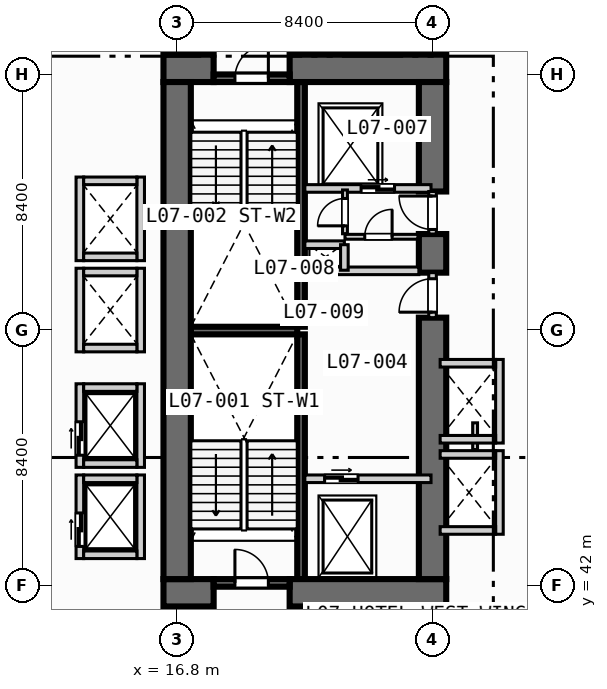
"""IFC4 building model, lengths in metres.
Left out: names, types, materials, properties, quantities, classifications, styles, units other than length and angle.
Written with IfcOpenShell. Run it as: python <this file> out.ifc"""

import sys

from ifc_helpers import new_model, si_unit, direction, frame, frame_2d, origin, place, context, subcontext, project, spatial, rectangle, extrude, element, fill, save


model = new_model("IFC4")
c1 = context("Model", 3, precision=1e-05, world=origin(), true_north=direction((0.0, 1.0)))
c2 = subcontext(c1, "Body", "Model", "MODEL_VIEW")
j1 = project(units=[si_unit("LENGTHUNIT", "METRE"), si_unit("PLANEANGLEUNIT", "RADIAN")], contexts=[c1])
p1 = place(None, origin())
s1 = spatial("IfcSite", under=j1, at=p1, CompositionType="ELEMENT")
p2 = place(p1, origin())
s2 = spatial("IfcBuilding", under=s1, at=p2, CompositionType="ELEMENT")
p3 = place(p2, frame((0.0, 0.0, 35.8)))
s3 = spatial("IfcBuildingStorey", under=s2, at=p3, CompositionType="ELEMENT", Elevation=35.8)
for number, where, z_axis, x_axis in (
    (1, (20.875, 42.2, 0.0), (0.0, 0.0, 1.0), (0.0, 1.0, 0.0)),
    (2, (20.875, 50.5, 0.0), (0.0, 0.0, 1.0), (0.0, 1.0, 0.0)),
):
    element("IfcWall", number, at=place(p3, frame(where, z_axis=z_axis, x_axis=x_axis)), inside=s3, PredefinedType="SOLIDWALL", context=c2, shape_type="SweptSolid", body=[
        extrude(rectangle(XDim=8.05, YDim=0.25, at=frame_2d((4.025, 0.0))), origin(), (0.0, 0.0, 1.0), 3.55),
    ])
p4 = place(p3, frame((17.25, 50.375, 0.0), z_axis=(0.0, 0.0, 1.0), x_axis=(1.0, 0.0, 0.0)))
e3 = element("IfcWall", 3, at=p4, inside=s3, PredefinedType="SOLIDWALL", context=c2, shape_type="SweptSolid", body=[
    extrude(rectangle(XDim=3.5, YDim=0.25, at=frame_2d((1.75, 0.0))), origin(), (0.0, 0.0, 1.0), 3.55),
])
p5 = place(p3, frame((16.35, 41.75, 0.0), z_axis=(0.0, 0.0, 1.0), x_axis=(1.0, 0.0, 0.0)))
e4 = element("IfcWall", 4, at=p5, inside=s3, PredefinedType="SHEAR", context=c2, shape_type="SweptSolid", body=[
    extrude(rectangle(XDim=1.65, YDim=0.9, at=frame_2d((0.825, 0.0))), origin(), (0.0, 0.0, 1.0), 3.55),
])
p6 = place(p3, frame((20.5, 41.75, 0.0), z_axis=(0.0, 0.0, 1.0), x_axis=(1.0, 0.0, 0.0)))
e5 = element("IfcWall", 5, at=p6, inside=s3, PredefinedType="SHEAR", context=c2, shape_type="SweptSolid", body=[
    extrude(rectangle(XDim=5.15, YDim=0.9, at=frame_2d((2.575, 0.0))), origin(), (0.0, 0.0, 1.0), 3.55),
])
p7 = place(p3, frame((16.35, 59.0, 0.0), z_axis=(0.0, 0.0, 1.0), x_axis=(1.0, 0.0, 0.0)))
e6 = element("IfcWall", 6, at=p7, inside=s3, PredefinedType="SHEAR", context=c2, shape_type="SweptSolid", body=[
    extrude(rectangle(XDim=1.65, YDim=0.9, at=frame_2d((0.825, 0.0))), origin(), (0.0, 0.0, 1.0), 3.55),
])
p8 = place(p3, frame((20.5, 59.0, 0.0), z_axis=(0.0, 0.0, 1.0), x_axis=(1.0, 0.0, 0.0)))
e7 = element("IfcWall", 7, at=p8, inside=s3, PredefinedType="SHEAR", context=c2, shape_type="SweptSolid", body=[
    extrude(rectangle(XDim=5.15, YDim=0.9, at=frame_2d((2.575, 0.0))), origin(), (0.0, 0.0, 1.0), 3.55),
])
p9 = place(p3, frame((16.8, 42.2, 0.0), z_axis=(0.0, 0.0, 1.0), x_axis=(0.0, 1.0, 0.0)))
e8 = element("IfcWall", 8, at=p9, inside=s3, PredefinedType="SHEAR", context=c2, shape_type="SweptSolid", body=[
    extrude(rectangle(XDim=16.35, YDim=0.9, at=frame_2d((8.175, 0.0))), origin(), (0.0, 0.0, 1.0), 3.55),
])
p10 = place(p3, frame((25.2, 42.2, 0.0), z_axis=(0.0, 0.0, 1.0), x_axis=(0.0, 1.0, 0.0)))
e9 = element("IfcWall", 9, at=p10, inside=s3, PredefinedType="SHEAR", context=c2, shape_type="SweptSolid", body=[
    extrude(rectangle(XDim=8.6, YDim=0.9, at=frame_2d((4.3, 0.0))), origin(), (0.0, 0.0, 1.0), 3.55),
])
p11 = place(p3, frame((25.2, 52.28, 0.0), z_axis=(0.0, 0.0, 1.0), x_axis=(0.0, 1.0, 0.0)))
e10 = element("IfcWall", 10, at=p11, inside=s3, PredefinedType="SHEAR", context=c2, shape_type="SweptSolid", body=[
    extrude(rectangle(XDim=1.27, YDim=0.9, at=frame_2d((0.635, 0.0))), origin(), (0.0, 0.0, 1.0), 3.55),
])
p12 = place(p3, frame((25.2, 54.95, 0.0), z_axis=(0.0, 0.0, 1.0), x_axis=(0.0, 1.0, 0.0)))
e11 = element("IfcWall", 11, at=p12, inside=s3, PredefinedType="SHEAR", context=c2, shape_type="SweptSolid", body=[
    extrude(rectangle(XDim=3.6, YDim=0.9, at=frame_2d((1.8, 0.0))), origin(), (0.0, 0.0, 1.0), 3.55),
])
p13 = place(p3, frame((18.0, 42.075, 0.0), z_axis=(0.0, 0.0, 1.0), x_axis=(1.0, 0.0, 0.0)))
e12 = element("IfcWall", 12, at=p13, inside=s3, PredefinedType="SOLIDWALL", context=c2, shape_type="SweptSolid", body=[
    extrude(rectangle(XDim=2.5, YDim=0.25, at=frame_2d((1.25, 0.0))), origin(), (0.0, 0.0, 1.0), 3.55),
])
p14 = place(p13, frame((0.7, 0.0, 0.0)))
e13 = element("IfcOpeningElement", 13, at=p14, cuts=e12, PredefinedType="OPENING", context=c2, shape_type="SweptSolid", body=[
    extrude(rectangle(XDim=1.1, YDim=2.15, at=frame_2d((0.55, 1.075))), frame((0.0, 0.135, 0.0), z_axis=(0.0, -1.0, 0.0), x_axis=(1.0, 0.0, 0.0)), (0.0, 0.0, 1.0), 0.27),
])
p15 = place(p3, frame((18.0, 58.675, 0.0), z_axis=(0.0, 0.0, 1.0), x_axis=(1.0, 0.0, 0.0)))
e14 = element("IfcWall", 14, at=p15, inside=s3, PredefinedType="SOLIDWALL", context=c2, shape_type="SweptSolid", body=[
    extrude(rectangle(XDim=2.5, YDim=0.25, at=frame_2d((1.25, 0.0))), origin(), (0.0, 0.0, 1.0), 3.55),
])
p16 = place(p15, frame((0.7, 0.0, 0.0)))
e15 = element("IfcOpeningElement", 15, at=p16, cuts=e14, PredefinedType="OPENING", context=c2, shape_type="SweptSolid", body=[
    extrude(rectangle(XDim=1.1, YDim=2.15, at=frame_2d((0.55, 1.075))), frame((0.0, 0.135, 0.0), z_axis=(0.0, -1.0, 0.0), x_axis=(1.0, 0.0, 0.0)), (0.0, 0.0, 1.0), 0.27),
])
p17 = place(p3, frame((21.0, 45.5, 0.0), z_axis=(0.0, 0.0, 1.0), x_axis=(1.0, 0.0, 0.0)))
e16 = element("IfcWall", 16, at=p17, inside=s3, PredefinedType="SOLIDWALL", context=c2, shape_type="SweptSolid", body=[
    extrude(rectangle(XDim=4.15, YDim=0.25, at=frame_2d((2.075, 0.0))), origin(), (0.0, 0.0, 1.0), 3.55),
])
p18 = place(p17, frame((0.65, 0.0, 0.0)))
e17 = element("IfcOpeningElement", 17, at=p18, cuts=e16, PredefinedType="OPENING", context=c2, shape_type="SweptSolid", body=[
    extrude(rectangle(XDim=1.1, YDim=2.15, at=frame_2d((0.55, 1.075))), frame((0.0, 0.135, 0.0), z_axis=(0.0, -1.0, 0.0), x_axis=(1.0, 0.0, 0.0)), (0.0, 0.0, 1.0), 0.27),
])
p19 = place(p3, frame((25.2, 50.8, 0.0), z_axis=(0.0, 0.0, 1.0), x_axis=(0.0, 1.0, 0.0)))
e18 = element("IfcWall", 18, at=p19, inside=s3, PredefinedType="SOLIDWALL", context=c2, shape_type="SweptSolid", body=[
    extrude(rectangle(XDim=1.48, YDim=0.25, at=frame_2d((0.74, 0.0))), origin(), (0.0, 0.0, 1.0), 3.55),
])
p20 = place(p19, frame((0.18, 0.0, 0.0)))
e19 = element("IfcOpeningElement", 19, at=p20, cuts=e18, PredefinedType="OPENING", context=c2, shape_type="SweptSolid", body=[
    extrude(rectangle(XDim=1.1, YDim=2.15, at=frame_2d((0.55, 1.075))), frame((0.0, 0.135, 0.0), z_axis=(0.0, -1.0, 0.0), x_axis=(1.0, 0.0, 0.0)), (0.0, 0.0, 1.0), 0.27),
])
p21 = place(p3, frame((21.0, 52.34, 0.0), z_axis=(0.0, 0.0, 1.0), x_axis=(1.0, 0.0, 0.0)))
e20 = element("IfcWall", 20, at=p21, inside=s3, PredefinedType="SOLIDWALL", context=c2, shape_type="SweptSolid", body=[
    extrude(rectangle(XDim=3.75, YDim=0.25, at=frame_2d((1.875, 0.0))), origin(), (0.0, 0.0, 1.0), 3.55),
])
p22 = place(p3, frame((21.0, 55.05, 0.0), z_axis=(0.0, 0.0, 1.0), x_axis=(1.0, 0.0, 0.0)))
e21 = element("IfcWall", 21, at=p22, inside=s3, PredefinedType="SOLIDWALL", context=c2, shape_type="SweptSolid", body=[
    extrude(rectangle(XDim=4.15, YDim=0.25, at=frame_2d((2.075, 0.0))), origin(), (0.0, 0.0, 1.0), 3.55),
])
p23 = place(p22, frame((1.85, 0.0, 0.0)))
e22 = element("IfcOpeningElement", 22, at=p23, cuts=e21, PredefinedType="OPENING", context=c2, shape_type="SweptSolid", body=[
    extrude(rectangle(XDim=1.1, YDim=2.15, at=frame_2d((0.55, 1.075))), frame((0.0, 0.135, 0.0), z_axis=(0.0, -1.0, 0.0), x_axis=(1.0, 0.0, 0.0)), (0.0, 0.0, 1.0), 0.27),
])
p24 = place(p3, frame((25.2, 53.55, 0.0), z_axis=(0.0, 0.0, 1.0), x_axis=(0.0, 1.0, 0.0)))
e23 = element("IfcWall", 23, at=p24, inside=s3, PredefinedType="SOLIDWALL", context=c2, shape_type="SweptSolid", body=[
    extrude(rectangle(XDim=1.4, YDim=0.25, at=frame_2d((0.7, 0.0))), origin(), (0.0, 0.0, 1.0), 3.55),
])
p25 = place(p24, frame((0.15, 0.0, 0.0)))
e24 = element("IfcOpeningElement", 24, at=p25, cuts=e23, PredefinedType="OPENING", context=c2, shape_type="SweptSolid", body=[
    extrude(rectangle(XDim=1.1, YDim=2.15, at=frame_2d((0.55, 1.075))), frame((0.0, 0.135, 0.0), z_axis=(0.0, -1.0, 0.0), x_axis=(1.0, 0.0, 0.0)), (0.0, 0.0, 1.0), 0.27),
])
p26 = place(p3, frame((21.0, 53.2, 0.0), z_axis=(0.0, 0.0, 1.0), x_axis=(1.0, 0.0, 0.0)))
e25 = element("IfcWall", 25, at=p26, inside=s3, PredefinedType="SOLIDWALL", context=c2, shape_type="SweptSolid", body=[
    extrude(rectangle(XDim=1.3, YDim=0.25, at=frame_2d((0.65, 0.0))), origin(), (0.0, 0.0, 1.0), 3.55),
])
p27 = place(p3, frame((22.3, 52.36, 0.0), z_axis=(0.0, 0.0, 1.0), x_axis=(0.0, 1.0, 0.0)))
e26 = element("IfcWall", 26, at=p27, inside=s3, PredefinedType="SOLIDWALL", context=c2, shape_type="SweptSolid", body=[
    extrude(rectangle(XDim=0.84, YDim=0.25, at=frame_2d((0.42, 0.0))), origin(), (0.0, 0.0, 1.0), 3.55),
])
p28 = place(p3, frame((22.32, 53.56, 0.0), z_axis=(0.0, 0.0, 1.0), x_axis=(0.0, 1.0, 0.0)))
e27 = element("IfcWall", 27, at=p28, inside=s3, PredefinedType="PARTITIONING", context=c2, shape_type="SweptSolid", body=[
    extrude(rectangle(XDim=1.44, YDim=0.16, at=frame_2d((0.72, 0.0))), origin(), (0.0, 0.0, 1.0), 3.55),
])
p29 = place(p28, frame((0.26, 0.0, 0.0)))
e28 = element("IfcOpeningElement", 28, at=p29, cuts=e27, PredefinedType="OPENING", context=c2, shape_type="SweptSolid", body=[
    extrude(rectangle(XDim=0.9, YDim=2.1, at=frame_2d((0.45, 1.05))), frame((0.0, 0.09, 0.0), z_axis=(0.0, -1.0, 0.0), x_axis=(1.0, 0.0, 0.0)), (0.0, 0.0, 1.0), 0.18),
])
p30 = place(p3, frame((22.32, 53.46, 0.0), z_axis=(0.0, 0.0, 1.0), x_axis=(1.0, 0.0, 0.0)))
e29 = element("IfcWall", 29, at=p30, inside=s3, PredefinedType="PARTITIONING", context=c2, shape_type="SweptSolid", body=[
    extrude(rectangle(XDim=2.4, YDim=0.16, at=frame_2d((1.2, 0.0))), origin(), (0.0, 0.0, 1.0), 3.55),
])
p31 = place(p30, frame((0.65, 0.0, 0.0)))
e30 = element("IfcOpeningElement", 30, at=p31, cuts=e29, PredefinedType="OPENING", context=c2, shape_type="SweptSolid", body=[
    extrude(rectangle(XDim=0.9, YDim=2.1, at=frame_2d((0.45, 1.05))), frame((0.0, 0.09, 0.0), z_axis=(0.0, -1.0, 0.0), x_axis=(1.0, 0.0, 0.0)), (0.0, 0.0, 1.0), 0.18),
])
p32 = place(p3, frame((13.6, 42.875, 0.0), z_axis=(0.0, 0.0, 1.0), x_axis=(0.0, 1.0, 0.0)))
e31 = element("IfcWall", 31, at=p32, inside=s3, PredefinedType="SOLIDWALL", context=c2, shape_type="SweptSolid", body=[
    extrude(rectangle(XDim=2.75, YDim=0.25, at=frame_2d((1.375, 0.0))), origin(), (0.0, 0.0, 1.0), 3.55),
])
p33 = place(p32, frame((0.4, 0.0, 0.0)))
e32 = element("IfcOpeningElement", 32, at=p33, cuts=e31, PredefinedType="OPENING", context=c2, shape_type="SweptSolid", body=[
    extrude(rectangle(XDim=1.1, YDim=2.15, at=frame_2d((0.55, 1.075))), frame((0.0, 0.135, 0.0), z_axis=(0.0, -1.0, 0.0), x_axis=(1.0, 0.0, 0.0)), (0.0, 0.0, 1.0), 0.27),
])
p34 = place(p3, frame((15.6, 42.875, 0.0), z_axis=(0.0, 0.0, 1.0), x_axis=(0.0, 1.0, 0.0)))
e33 = element("IfcWall", 33, at=p34, inside=s3, PredefinedType="SOLIDWALL", context=c2, shape_type="SweptSolid", body=[
    extrude(rectangle(XDim=2.75, YDim=0.25, at=frame_2d((1.375, 0.0))), origin(), (0.0, 0.0, 1.0), 3.55),
])
for number, where, z_axis, x_axis in (
    (34, (13.725, 43.0, 0.0), (0.0, 0.0, 1.0), (1.0, 0.0, 0.0)),
    (35, (13.725, 45.5, 0.0), (0.0, 0.0, 1.0), (1.0, 0.0, 0.0)),
):
    element("IfcWall", number, at=place(p3, frame(where, z_axis=z_axis, x_axis=x_axis)), inside=s3, PredefinedType="SOLIDWALL", context=c2, shape_type="SweptSolid", body=[
        extrude(rectangle(XDim=1.75, YDim=0.25, at=frame_2d((0.875, 0.0))), origin(), (0.0, 0.0, 1.0), 3.55),
    ])
p35 = place(p3, frame((13.6, 45.875, 0.0), z_axis=(0.0, 0.0, 1.0), x_axis=(0.0, 1.0, 0.0)))
e36 = element("IfcWall", 36, at=p35, inside=s3, PredefinedType="SOLIDWALL", context=c2, shape_type="SweptSolid", body=[
    extrude(rectangle(XDim=2.75, YDim=0.25, at=frame_2d((1.375, 0.0))), origin(), (0.0, 0.0, 1.0), 3.55),
])
p36 = place(p35, frame((0.4, 0.0, 0.0)))
e37 = element("IfcOpeningElement", 37, at=p36, cuts=e36, PredefinedType="OPENING", context=c2, shape_type="SweptSolid", body=[
    extrude(rectangle(XDim=1.1, YDim=2.15, at=frame_2d((0.55, 1.075))), frame((0.0, 0.135, 0.0), z_axis=(0.0, -1.0, 0.0), x_axis=(1.0, 0.0, 0.0)), (0.0, 0.0, 1.0), 0.27),
])
p37 = place(p3, frame((15.6, 45.875, 0.0), z_axis=(0.0, 0.0, 1.0), x_axis=(0.0, 1.0, 0.0)))
e38 = element("IfcWall", 38, at=p37, inside=s3, PredefinedType="SOLIDWALL", context=c2, shape_type="SweptSolid", body=[
    extrude(rectangle(XDim=2.75, YDim=0.25, at=frame_2d((1.375, 0.0))), origin(), (0.0, 0.0, 1.0), 3.55),
])
for number, where, z_axis, x_axis in (
    (39, (13.725, 46.0, 0.0), (0.0, 0.0, 1.0), (1.0, 0.0, 0.0)),
    (40, (13.725, 48.5, 0.0), (0.0, 0.0, 1.0), (1.0, 0.0, 0.0)),
):
    element("IfcWall", number, at=place(p3, frame(where, z_axis=z_axis, x_axis=x_axis)), inside=s3, PredefinedType="SOLIDWALL", context=c2, shape_type="SweptSolid", body=[
        extrude(rectangle(XDim=1.75, YDim=0.25, at=frame_2d((0.875, 0.0))), origin(), (0.0, 0.0, 1.0), 3.55),
    ])
for number, where, z_axis, x_axis in (
    (41, (13.6, 49.675, 0.0), (0.0, 0.0, 1.0), (0.0, 1.0, 0.0)),
    (42, (15.6, 49.675, 0.0), (0.0, 0.0, 1.0), (0.0, 1.0, 0.0)),
):
    element("IfcWall", number, at=place(p3, frame(where, z_axis=z_axis, x_axis=x_axis)), inside=s3, PredefinedType="SOLIDWALL", context=c2, shape_type="SweptSolid", body=[
        extrude(rectangle(XDim=2.75, YDim=0.25, at=frame_2d((1.375, 0.0))), origin(), (0.0, 0.0, 1.0), 3.55),
    ])
for number, where, z_axis, x_axis in (
    (43, (13.725, 49.8, 0.0), (0.0, 0.0, 1.0), (1.0, 0.0, 0.0)),
    (44, (13.725, 52.3, 0.0), (0.0, 0.0, 1.0), (1.0, 0.0, 0.0)),
):
    element("IfcWall", number, at=place(p3, frame(where, z_axis=z_axis, x_axis=x_axis)), inside=s3, PredefinedType="SOLIDWALL", context=c2, shape_type="SweptSolid", body=[
        extrude(rectangle(XDim=1.75, YDim=0.25, at=frame_2d((0.875, 0.0))), origin(), (0.0, 0.0, 1.0), 3.55),
    ])
for number, where, z_axis, x_axis in (
    (45, (13.6, 52.675, 0.0), (0.0, 0.0, 1.0), (0.0, 1.0, 0.0)),
    (46, (15.6, 52.675, 0.0), (0.0, 0.0, 1.0), (0.0, 1.0, 0.0)),
):
    element("IfcWall", number, at=place(p3, frame(where, z_axis=z_axis, x_axis=x_axis)), inside=s3, PredefinedType="SOLIDWALL", context=c2, shape_type="SweptSolid", body=[
        extrude(rectangle(XDim=2.75, YDim=0.25, at=frame_2d((1.375, 0.0))), origin(), (0.0, 0.0, 1.0), 3.55),
    ])
for number, where, z_axis, x_axis in (
    (47, (13.725, 52.8, 0.0), (0.0, 0.0, 1.0), (1.0, 0.0, 0.0)),
    (48, (13.725, 55.3, 0.0), (0.0, 0.0, 1.0), (1.0, 0.0, 0.0)),
):
    element("IfcWall", number, at=place(p3, frame(where, z_axis=z_axis, x_axis=x_axis)), inside=s3, PredefinedType="SOLIDWALL", context=c2, shape_type="SweptSolid", body=[
        extrude(rectangle(XDim=1.75, YDim=0.25, at=frame_2d((0.875, 0.0))), origin(), (0.0, 0.0, 1.0), 3.55),
    ])
p38 = place(p3, frame((27.4, 43.675, 0.0), z_axis=(0.0, 0.0, 1.0), x_axis=(0.0, 1.0, 0.0)))
e49 = element("IfcWall", 49, at=p38, inside=s3, PredefinedType="SOLIDWALL", context=c2, shape_type="SweptSolid", body=[
    extrude(rectangle(XDim=2.75, YDim=0.25, at=frame_2d((1.375, 0.0))), origin(), (0.0, 0.0, 1.0), 3.55),
])
for number, where, z_axis, x_axis in (
    (50, (25.45, 43.8, 0.0), (0.0, 0.0, 1.0), (1.0, 0.0, 0.0)),
    (51, (25.45, 46.3, 0.0), (0.0, 0.0, 1.0), (1.0, 0.0, 0.0)),
):
    element("IfcWall", number, at=place(p3, frame(where, z_axis=z_axis, x_axis=x_axis)), inside=s3, PredefinedType="SOLIDWALL", context=c2, shape_type="SweptSolid", body=[
        extrude(rectangle(XDim=1.825, YDim=0.25, at=frame_2d((0.913, 0.0))), origin(), (0.0, 0.0, 1.0), 3.55),
    ])
p39 = place(p3, frame((26.6, 46.46, 0.0), z_axis=(0.0, 0.0, 1.0), x_axis=(0.0, 1.0, 0.0)))
e52 = element("IfcWall", 52, at=p39, inside=s3, PredefinedType="PARTITIONING", context=c2, shape_type="SweptSolid", body=[
    extrude(rectangle(XDim=0.88, YDim=0.16, at=frame_2d((0.44, 0.0))), origin(), (0.0, 0.0, 1.0), 3.55),
])
p40 = place(p3, frame((27.4, 46.675, 0.0), z_axis=(0.0, 0.0, 1.0), x_axis=(0.0, 1.0, 0.0)))
e53 = element("IfcWall", 53, at=p40, inside=s3, PredefinedType="SOLIDWALL", context=c2, shape_type="SweptSolid", body=[
    extrude(rectangle(XDim=2.75, YDim=0.25, at=frame_2d((1.375, 0.0))), origin(), (0.0, 0.0, 1.0), 3.55),
])
for number, where, z_axis, x_axis in (
    (54, (25.45, 46.8, 0.0), (0.0, 0.0, 1.0), (1.0, 0.0, 0.0)),
    (55, (25.45, 49.3, 0.0), (0.0, 0.0, 1.0), (1.0, 0.0, 0.0)),
):
    element("IfcWall", number, at=place(p3, frame(where, z_axis=z_axis, x_axis=x_axis)), inside=s3, PredefinedType="SOLIDWALL", context=c2, shape_type="SweptSolid", body=[
        extrude(rectangle(XDim=1.825, YDim=0.25, at=frame_2d((0.913, 0.0))), origin(), (0.0, 0.0, 1.0), 3.55),
    ])
p41 = place(p14, origin())
e56 = element("IfcDoor", 56, at=p41, inside=s3, OperationType="SINGLE_SWING_LEFT", PredefinedType="DOOR", context=c2, shape_type="SweptSolid", body=[
    extrude(rectangle(XDim=1.1, YDim=2.15, at=frame_2d((0.55, 1.075))), frame((0.0, 0.025, 0.0), z_axis=(0.0, -1.0, 0.0), x_axis=(1.0, 0.0, 0.0)), (0.0, 0.0, 1.0), 0.05),
])
fill(e13, e56)
p42 = place(p16, origin())
e57 = element("IfcDoor", 57, at=p42, inside=s3, OperationType="SINGLE_SWING_RIGHT", PredefinedType="DOOR", context=c2, shape_type="SweptSolid", body=[
    extrude(rectangle(XDim=1.1, YDim=2.15, at=frame_2d((0.55, 1.075))), frame((0.0, 0.025, 0.0), z_axis=(0.0, -1.0, 0.0), x_axis=(1.0, 0.0, 0.0)), (0.0, 0.0, 1.0), 0.05),
])
fill(e15, e57)
p43 = place(p18, origin())
e58 = element("IfcDoor", 58, at=p43, inside=s3, OperationType="SLIDING_TO_LEFT", PredefinedType="DOOR", context=c2, shape_type="SweptSolid", body=[
    extrude(rectangle(XDim=1.1, YDim=2.15, at=frame_2d((0.55, 1.075))), frame((0.0, 0.025, 0.0), z_axis=(0.0, -1.0, 0.0), x_axis=(1.0, 0.0, 0.0)), (0.0, 0.0, 1.0), 0.05),
])
fill(e17, e58)
p44 = place(p20, origin())
e59 = element("IfcDoor", 59, at=p44, inside=s3, OperationType="SINGLE_SWING_LEFT", PredefinedType="DOOR", context=c2, shape_type="SweptSolid", body=[
    extrude(rectangle(XDim=1.1, YDim=2.15, at=frame_2d((0.55, 1.075))), frame((0.0, 0.025, 0.0), z_axis=(0.0, -1.0, 0.0), x_axis=(1.0, 0.0, 0.0)), (0.0, 0.0, 1.0), 0.05),
])
fill(e19, e59)
p45 = place(p23, origin())
e60 = element("IfcDoor", 60, at=p45, inside=s3, OperationType="SLIDING_TO_LEFT", PredefinedType="DOOR", context=c2, shape_type="SweptSolid", body=[
    extrude(rectangle(XDim=1.1, YDim=2.15, at=frame_2d((0.55, 1.075))), frame((0.0, 0.025, 0.0), z_axis=(0.0, -1.0, 0.0), x_axis=(1.0, 0.0, 0.0)), (0.0, 0.0, 1.0), 0.05),
])
fill(e22, e60)
p46 = place(p25, origin())
e61 = element("IfcDoor", 61, at=p46, inside=s3, OperationType="SINGLE_SWING_RIGHT", PredefinedType="DOOR", context=c2, shape_type="SweptSolid", body=[
    extrude(rectangle(XDim=1.1, YDim=2.15, at=frame_2d((0.55, 1.075))), frame((0.0, 0.025, 0.0), z_axis=(0.0, -1.0, 0.0), x_axis=(1.0, 0.0, 0.0)), (0.0, 0.0, 1.0), 0.05),
])
fill(e24, e61)
p47 = place(p29, origin())
e62 = element("IfcDoor", 62, at=p47, inside=s3, OperationType="SINGLE_SWING_LEFT", PredefinedType="DOOR", context=c2, shape_type="SweptSolid", body=[
    extrude(rectangle(XDim=0.9, YDim=2.1, at=frame_2d((0.45, 1.05))), frame((0.0, 0.025, 0.0), z_axis=(0.0, -1.0, 0.0), x_axis=(1.0, 0.0, 0.0)), (0.0, 0.0, 1.0), 0.05),
])
fill(e28, e62)
p48 = place(p31, origin())
e63 = element("IfcDoor", 63, at=p48, inside=s3, OperationType="SINGLE_SWING_RIGHT", PredefinedType="DOOR", context=c2, shape_type="SweptSolid", body=[
    extrude(rectangle(XDim=0.9, YDim=2.1, at=frame_2d((0.45, 1.05))), frame((0.0, 0.025, 0.0), z_axis=(0.0, -1.0, 0.0), x_axis=(1.0, 0.0, 0.0)), (0.0, 0.0, 1.0), 0.05),
])
fill(e30, e63)
p49 = place(p33, origin())
e64 = element("IfcDoor", 64, at=p49, inside=s3, OperationType="SLIDING_TO_LEFT", PredefinedType="DOOR", context=c2, shape_type="SweptSolid", body=[
    extrude(rectangle(XDim=1.1, YDim=2.15, at=frame_2d((0.55, 1.075))), frame((0.0, 0.025, 0.0), z_axis=(0.0, -1.0, 0.0), x_axis=(1.0, 0.0, 0.0)), (0.0, 0.0, 1.0), 0.05),
])
fill(e32, e64)
p50 = place(p36, origin())
e65 = element("IfcDoor", 65, at=p50, inside=s3, OperationType="SLIDING_TO_LEFT", PredefinedType="DOOR", context=c2, shape_type="SweptSolid", body=[
    extrude(rectangle(XDim=1.1, YDim=2.15, at=frame_2d((0.55, 1.075))), frame((0.0, 0.025, 0.0), z_axis=(0.0, -1.0, 0.0), x_axis=(1.0, 0.0, 0.0)), (0.0, 0.0, 1.0), 0.05),
])
fill(e37, e65)
save(model, sys.argv[1])
